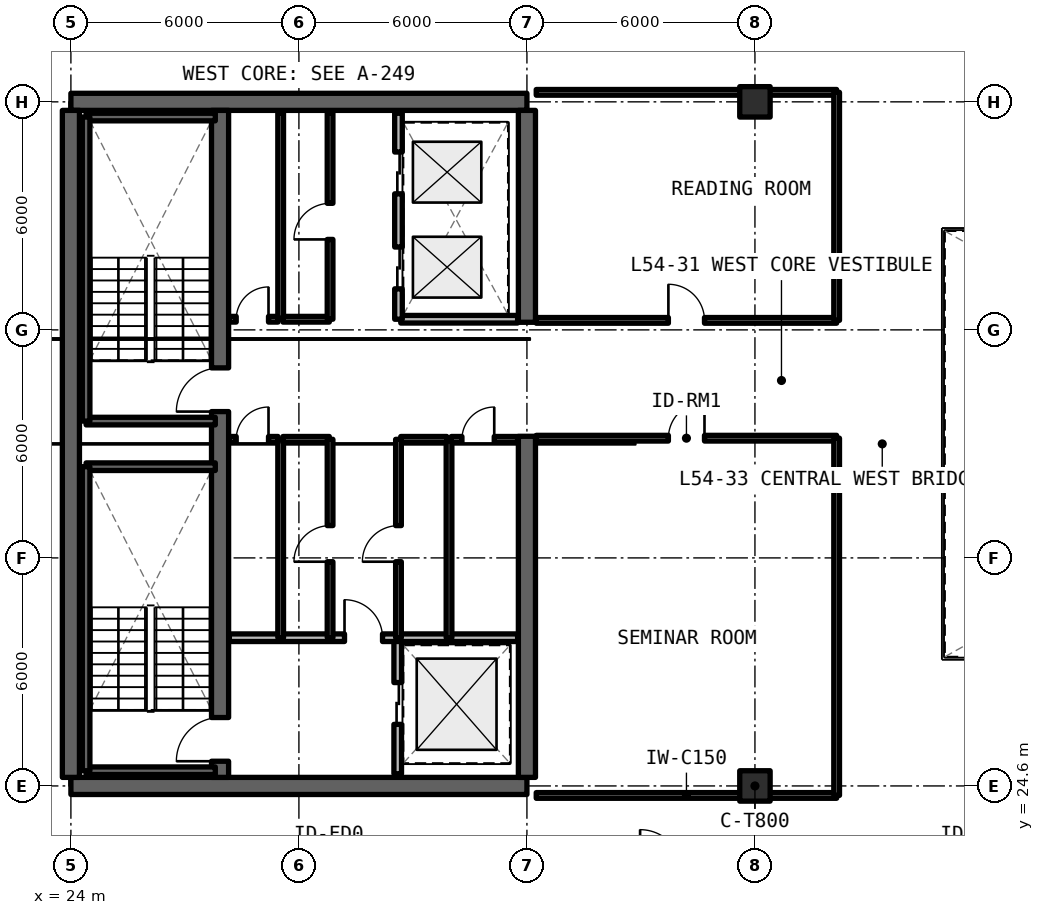
"""IFC4 building model, lengths in metres.
Left out: names, types, materials, properties, quantities, classifications, styles, units other than length and angle.
Written with IfcOpenShell. Run it as: python <this file> out.ifc"""

import sys

from ifc_helpers import new_model, si_unit, direction, frame, frame_2d, origin, origin_2d, place, context, subcontext, project, spatial, rectangle, extrude, element, fill, save


model = new_model("IFC4")
c1 = context("Model", 3, precision=1e-05, world=origin(), true_north=direction((0.0, 1.0)))
c2 = subcontext(c1, "Body", "Model", "MODEL_VIEW")
j1 = project(units=[si_unit("LENGTHUNIT", "METRE"), si_unit("PLANEANGLEUNIT", "RADIAN")], contexts=[c1])
p1 = place(None, origin())
s1 = spatial("IfcSite", under=j1, at=p1, CompositionType="ELEMENT")
p2 = place(p1, origin())
s2 = spatial("IfcBuilding", under=s1, at=p2, CompositionType="ELEMENT")
p3 = place(p2, frame((0.0, 0.0, 195.03)))
s3 = spatial("IfcBuildingStorey", under=s2, at=p3, CompositionType="ELEMENT", Elevation=195.03)
for number, where, z_axis, x_axis in (
    (1, (24.0, 24.6, 0.0), (0.0, 0.0, 1.0), (1.0, 0.0, 0.0)),
    (2, (36.0, 42.6, 0.0), (0.0, 0.0, 1.0), (-1.0, 0.0, 0.0)),
):
    element("IfcWall", number, at=place(p3, frame(where, z_axis=z_axis, x_axis=x_axis)), inside=s3, PredefinedType="SHEAR", context=c2, shape_type="SweptSolid", body=[
        extrude(rectangle(XDim=12.0, YDim=0.45, at=frame_2d((6.0, 0.0))), origin(), (0.0, 0.0, 1.0), 3.3),
    ])
p4 = place(p3, frame((24.0, 24.825, 0.0), z_axis=(0.0, 0.0, 1.0), x_axis=(0.0, 1.0, 0.0)))
e3 = element("IfcWall", 3, at=p4, inside=s3, PredefinedType="SHEAR", context=c2, shape_type="SweptSolid", body=[
    extrude(rectangle(XDim=17.55, YDim=0.45, at=frame_2d((8.775, 0.0))), origin(), (0.0, 0.0, 1.0), 3.3),
])
p5 = place(p3, frame((36.0, 24.825, 0.0), z_axis=(0.0, 0.0, 1.0), x_axis=(0.0, 1.0, 0.0)))
e4 = element("IfcWall", 4, at=p5, inside=s3, PredefinedType="SHEAR", context=c2, shape_type="SweptSolid", body=[
    extrude(rectangle(XDim=8.975, YDim=0.45, at=frame_2d((4.488, 0.0))), origin(), (0.0, 0.0, 1.0), 3.3),
])
p6 = place(p3, frame((36.0, 36.8, 0.0), z_axis=(0.0, 0.0, 1.0), x_axis=(0.0, 1.0, 0.0)))
e5 = element("IfcWall", 5, at=p6, inside=s3, PredefinedType="SHEAR", context=c2, shape_type="SweptSolid", body=[
    extrude(rectangle(XDim=5.575, YDim=0.45, at=frame_2d((2.788, 0.0))), origin(), (0.0, 0.0, 1.0), 3.3),
])
p7 = place(p3, frame((27.925, 24.825, 0.0), z_axis=(0.0, 0.0, 1.0), x_axis=(0.0, 1.0, 0.0)))
e6 = element("IfcWall", 6, at=p7, inside=s3, PredefinedType="SHEAR", context=c2, shape_type="SweptSolid", body=[
    extrude(rectangle(XDim=17.55, YDim=0.45, at=frame_2d((8.775, 0.0))), origin(), (0.0, 0.0, 1.0), 3.3),
])
p8 = place(p7, frame((0.425, 0.0, 0.0)))
e7 = element("IfcOpeningElement", 7, at=p8, cuts=e6, PredefinedType="OPENING", context=c2, shape_type="SweptSolid", body=[
    extrude(rectangle(XDim=1.15, YDim=2.15, at=frame_2d((0.575, 1.075))), frame((0.0, 0.235, 0.0), z_axis=(0.0, -1.0, 0.0), x_axis=(1.0, 0.0, 0.0)), (0.0, 0.0, 1.0), 0.47),
])
p9 = place(p7, frame((9.625, 0.0, 0.0)))
e8 = element("IfcOpeningElement", 8, at=p9, cuts=e6, PredefinedType="OPENING", context=c2, shape_type="SweptSolid", body=[
    extrude(rectangle(XDim=1.15, YDim=2.15, at=frame_2d((0.575, 1.075))), frame((0.0, 0.235, 0.0), z_axis=(0.0, -1.0, 0.0), x_axis=(1.0, 0.0, 0.0)), (0.0, 0.0, 1.0), 0.47),
])
for number, where, z_axis, x_axis in (
    (9, (42.0, 24.6, 0.0), (0.0, 0.0, 1.0), (1.0, 0.0, 0.0)),
    (10, (42.0, 42.6, 0.0), (0.0, 0.0, 1.0), (1.0, 0.0, 0.0)),
):
    element("IfcColumn", number, at=place(p3, frame(where, z_axis=z_axis, x_axis=x_axis)), inside=s3, PredefinedType="COLUMN", context=c2, shape_type="SweptSolid", body=[
        extrude(rectangle(XDim=0.8, YDim=0.8, at=origin_2d()), origin(), (0.0, 0.0, 1.0), 3.3),
    ])
p10 = place(p3, frame((32.6, 24.92, 0.0), z_axis=(0.0, 0.0, 1.0), x_axis=(0.0, 1.0, 0.0)))
e11 = element("IfcWall", 11, at=p10, inside=s3, PredefinedType="SOLIDWALL", context=c2, shape_type="SweptSolid", body=[
    extrude(rectangle(XDim=3.58, YDim=0.2, at=frame_2d((1.79, 0.0))), origin(), (0.0, 0.0, 1.0), 2.35),
])
p11 = place(p10, frame((1.3, 0.0, 0.0)))
e12 = element("IfcOpeningElement", 12, at=p11, cuts=e11, PredefinedType="OPENING", context=c2, shape_type="SweptSolid", body=[
    extrude(rectangle(XDim=1.1, YDim=2.2, at=frame_2d((0.55, 1.1))), frame((0.0, 0.11, 0.0), z_axis=(0.0, -1.0, 0.0), x_axis=(1.0, 0.0, 0.0)), (0.0, 0.0, 1.0), 0.22),
])
p12 = place(p3, frame((28.17, 28.5, 0.0), z_axis=(0.0, 0.0, 1.0), x_axis=(1.0, 0.0, 0.0)))
e13 = element("IfcWall", 13, at=p12, inside=s3, PredefinedType="SOLIDWALL", context=c2, shape_type="SweptSolid", body=[
    extrude(rectangle(XDim=7.585, YDim=0.2, at=frame_2d((3.792, 0.0))), origin(), (0.0, 0.0, 1.0), 2.35),
])
p13 = place(p12, frame((3.03, 0.0, 0.0)))
e14 = element("IfcOpeningElement", 14, at=p13, cuts=e13, PredefinedType="OPENING", context=c2, shape_type="SweptSolid", body=[
    extrude(rectangle(XDim=1.0, YDim=2.15, at=frame_2d((0.5, 1.075))), frame((0.0, 0.11, 0.0), z_axis=(0.0, -1.0, 0.0), x_axis=(1.0, 0.0, 0.0)), (0.0, 0.0, 1.0), 0.22),
])
p14 = place(p3, frame((29.52, 28.5, 0.0), z_axis=(0.0, 0.0, 1.0), x_axis=(0.0, 1.0, 0.0)))
e15 = element("IfcWall", 15, at=p14, inside=s3, PredefinedType="SOLIDWALL", context=c2, shape_type="SweptSolid", body=[
    extrude(rectangle(XDim=5.22, YDim=0.15, at=frame_2d((2.61, 0.0))), origin(), (0.0, 0.0, 1.0), 2.35),
])
p15 = place(p3, frame((28.17, 33.72, 0.0), z_axis=(0.0, 0.0, 1.0), x_axis=(1.0, 0.0, 0.0)))
e16 = element("IfcWall", 16, at=p15, inside=s3, PredefinedType="SOLIDWALL", context=c2, shape_type="SweptSolid", body=[
    extrude(rectangle(XDim=1.28, YDim=0.15, at=frame_2d((0.64, 0.0))), origin(), (0.0, 0.0, 1.0), 2.35),
])
p16 = place(p15, frame((0.18, 0.0, 0.0)))
e17 = element("IfcOpeningElement", 17, at=p16, cuts=e16, PredefinedType="OPENING", context=c2, shape_type="SweptSolid", body=[
    extrude(rectangle(XDim=0.85, YDim=2.1, at=frame_2d((0.425, 1.05))), frame((0.0, 0.085, 0.0), z_axis=(0.0, -1.0, 0.0), x_axis=(1.0, 0.0, 0.0)), (0.0, 0.0, 1.0), 0.17),
])
p17 = place(p3, frame((29.58, 33.72, 0.0), z_axis=(0.0, 0.0, 1.0), x_axis=(1.0, 0.0, 0.0)))
e18 = element("IfcWall", 18, at=p17, inside=s3, PredefinedType="SOLIDWALL", context=c2, shape_type="SweptSolid", body=[
    extrude(rectangle(XDim=1.22, YDim=0.15, at=frame_2d((0.61, 0.0))), origin(), (0.0, 0.0, 1.0), 2.35),
])
p18 = place(p3, frame((30.82, 28.5, 0.0), z_axis=(0.0, 0.0, 1.0), x_axis=(0.0, 1.0, 0.0)))
e19 = element("IfcWall", 19, at=p18, inside=s3, PredefinedType="SOLIDWALL", context=c2, shape_type="SweptSolid", body=[
    extrude(rectangle(XDim=5.22, YDim=0.15, at=frame_2d((2.61, 0.0))), origin(), (0.0, 0.0, 1.0), 2.35),
])
p19 = place(p18, frame((2.0, 0.0, 0.0)))
e20 = element("IfcOpeningElement", 20, at=p19, cuts=e19, PredefinedType="OPENING", context=c2, shape_type="SweptSolid", body=[
    extrude(rectangle(XDim=0.95, YDim=2.15, at=frame_2d((0.475, 1.075))), frame((0.0, 0.085, 0.0), z_axis=(0.0, -1.0, 0.0), x_axis=(1.0, 0.0, 0.0)), (0.0, 0.0, 1.0), 0.17),
])
p20 = place(p3, frame((33.95, 28.5, 0.0), z_axis=(0.0, 0.0, 1.0), x_axis=(0.0, 1.0, 0.0)))
e21 = element("IfcWall", 21, at=p20, inside=s3, PredefinedType="SOLIDWALL", context=c2, shape_type="SweptSolid", body=[
    extrude(rectangle(XDim=5.22, YDim=0.15, at=frame_2d((2.61, 0.0))), origin(), (0.0, 0.0, 1.0), 2.35),
])
p21 = place(p3, frame((32.68, 33.72, 0.0), z_axis=(0.0, 0.0, 1.0), x_axis=(1.0, 0.0, 0.0)))
e22 = element("IfcWall", 22, at=p21, inside=s3, PredefinedType="SOLIDWALL", context=c2, shape_type="SweptSolid", body=[
    extrude(rectangle(XDim=1.21, YDim=0.15, at=frame_2d((0.605, 0.0))), origin(), (0.0, 0.0, 1.0), 2.35),
])
p22 = place(p3, frame((34.01, 33.72, 0.0), z_axis=(0.0, 0.0, 1.0), x_axis=(1.0, 0.0, 0.0)))
e23 = element("IfcWall", 23, at=p22, inside=s3, PredefinedType="SOLIDWALL", context=c2, shape_type="SweptSolid", body=[
    extrude(rectangle(XDim=1.745, YDim=0.15, at=frame_2d((0.873, 0.0))), origin(), (0.0, 0.0, 1.0), 2.35),
])
p23 = place(p22, frame((0.28, 0.0, 0.0)))
e24 = element("IfcOpeningElement", 24, at=p23, cuts=e23, PredefinedType="OPENING", context=c2, shape_type="SweptSolid", body=[
    extrude(rectangle(XDim=0.85, YDim=2.1, at=frame_2d((0.425, 1.05))), frame((0.0, 0.085, 0.0), z_axis=(0.0, -1.0, 0.0), x_axis=(1.0, 0.0, 0.0)), (0.0, 0.0, 1.0), 0.17),
])
p24 = place(p3, frame((32.62, 28.5, 0.0), z_axis=(0.0, 0.0, 1.0), x_axis=(0.0, 1.0, 0.0)))
e25 = element("IfcWall", 25, at=p24, inside=s3, PredefinedType="SOLIDWALL", context=c2, shape_type="SweptSolid", body=[
    extrude(rectangle(XDim=5.22, YDim=0.15, at=frame_2d((2.61, 0.0))), origin(), (0.0, 0.0, 1.0), 2.35),
])
p25 = place(p24, frame((2.0, 0.0, 0.0)))
e26 = element("IfcOpeningElement", 26, at=p25, cuts=e25, PredefinedType="OPENING", context=c2, shape_type="SweptSolid", body=[
    extrude(rectangle(XDim=0.95, YDim=2.15, at=frame_2d((0.475, 1.075))), frame((0.0, 0.085, 0.0), z_axis=(0.0, -1.0, 0.0), x_axis=(1.0, 0.0, 0.0)), (0.0, 0.0, 1.0), 0.17),
])
p26 = place(p3, frame((29.52, 36.88, 0.0), z_axis=(0.0, 0.0, 1.0), x_axis=(0.0, 1.0, 0.0)))
e27 = element("IfcWall", 27, at=p26, inside=s3, PredefinedType="SOLIDWALL", context=c2, shape_type="SweptSolid", body=[
    extrude(rectangle(XDim=5.42, YDim=0.15, at=frame_2d((2.71, 0.0))), origin(), (0.0, 0.0, 1.0), 2.35),
])
p27 = place(p3, frame((28.17, 36.88, 0.0), z_axis=(0.0, 0.0, 1.0), x_axis=(1.0, 0.0, 0.0)))
e28 = element("IfcWall", 28, at=p27, inside=s3, PredefinedType="SOLIDWALL", context=c2, shape_type="SweptSolid", body=[
    extrude(rectangle(XDim=1.28, YDim=0.15, at=frame_2d((0.64, 0.0))), origin(), (0.0, 0.0, 1.0), 2.35),
])
p28 = place(p27, frame((0.18, 0.0, 0.0)))
e29 = element("IfcOpeningElement", 29, at=p28, cuts=e28, PredefinedType="OPENING", context=c2, shape_type="SweptSolid", body=[
    extrude(rectangle(XDim=0.85, YDim=2.1, at=frame_2d((0.425, 1.05))), frame((0.0, 0.085, 0.0), z_axis=(0.0, -1.0, 0.0), x_axis=(1.0, 0.0, 0.0)), (0.0, 0.0, 1.0), 0.17),
])
p29 = place(p3, frame((29.58, 36.88, 0.0), z_axis=(0.0, 0.0, 1.0), x_axis=(1.0, 0.0, 0.0)))
e30 = element("IfcWall", 30, at=p29, inside=s3, PredefinedType="SOLIDWALL", context=c2, shape_type="SweptSolid", body=[
    extrude(rectangle(XDim=1.22, YDim=0.15, at=frame_2d((0.61, 0.0))), origin(), (0.0, 0.0, 1.0), 2.35),
])
p30 = place(p3, frame((30.82, 36.88, 0.0), z_axis=(0.0, 0.0, 1.0), x_axis=(0.0, 1.0, 0.0)))
e31 = element("IfcWall", 31, at=p30, inside=s3, PredefinedType="SOLIDWALL", context=c2, shape_type="SweptSolid", body=[
    extrude(rectangle(XDim=5.42, YDim=0.15, at=frame_2d((2.71, 0.0))), origin(), (0.0, 0.0, 1.0), 2.35),
])
p31 = place(p30, frame((2.1, 0.0, 0.0)))
e32 = element("IfcOpeningElement", 32, at=p31, cuts=e31, PredefinedType="OPENING", context=c2, shape_type="SweptSolid", body=[
    extrude(rectangle(XDim=0.95, YDim=2.15, at=frame_2d((0.475, 1.075))), frame((0.0, 0.085, 0.0), z_axis=(0.0, -1.0, 0.0), x_axis=(1.0, 0.0, 0.0)), (0.0, 0.0, 1.0), 0.17),
])
p32 = place(p3, frame((32.68, 36.88, 0.0), z_axis=(0.0, 0.0, 1.0), x_axis=(1.0, 0.0, 0.0)))
e33 = element("IfcWall", 33, at=p32, inside=s3, PredefinedType="SOLIDWALL", context=c2, shape_type="SweptSolid", body=[
    extrude(rectangle(XDim=3.075, YDim=0.2, at=frame_2d((1.538, 0.0))), origin(), (0.0, 0.0, 1.0), 2.35),
])
p33 = place(p3, frame((32.62, 36.88, 0.0), z_axis=(0.0, 0.0, 1.0), x_axis=(0.0, 1.0, 0.0)))
e34 = element("IfcWall", 34, at=p33, inside=s3, PredefinedType="SOLIDWALL", context=c2, shape_type="SweptSolid", body=[
    extrude(rectangle(XDim=5.42, YDim=0.2, at=frame_2d((2.71, 0.0))), origin(), (0.0, 0.0, 1.0), 2.35),
])
p34 = place(p33, frame((0.8, 0.0, 0.0)))
e35 = element("IfcOpeningElement", 35, at=p34, cuts=e34, PredefinedType="OPENING", context=c2, shape_type="SweptSolid", body=[
    extrude(rectangle(XDim=1.1, YDim=2.2, at=frame_2d((0.55, 1.1))), frame((0.0, 0.11, 0.0), z_axis=(0.0, -1.0, 0.0), x_axis=(1.0, 0.0, 0.0)), (0.0, 0.0, 1.0), 0.22),
])
p35 = place(p33, frame((3.3, 0.0, 0.0)))
e36 = element("IfcOpeningElement", 36, at=p35, cuts=e34, PredefinedType="OPENING", context=c2, shape_type="SweptSolid", body=[
    extrude(rectangle(XDim=1.1, YDim=2.2, at=frame_2d((0.55, 1.1))), frame((0.0, 0.11, 0.0), z_axis=(0.0, -1.0, 0.0), x_axis=(1.0, 0.0, 0.0)), (0.0, 0.0, 1.0), 0.22),
])
p36 = place(p3, frame((36.245, 24.35, 0.0), z_axis=(0.0, 0.0, 1.0), x_axis=(1.0, 0.0, 0.0)))
e37 = element("IfcWall", 37, at=p36, inside=s3, PredefinedType="SOLIDWALL", context=c2, shape_type="SweptSolid", body=[
    extrude(rectangle(XDim=7.905, YDim=0.15, at=frame_2d((3.952, 0.0))), origin(), (0.0, 0.0, 1.0), 2.35),
])
p37 = place(p3, frame((36.245, 33.75, 0.0), z_axis=(0.0, 0.0, 1.0), x_axis=(1.0, 0.0, 0.0)))
e38 = element("IfcWall", 38, at=p37, inside=s3, PredefinedType="SOLIDWALL", context=c2, shape_type="SweptSolid", body=[
    extrude(rectangle(XDim=7.905, YDim=0.15, at=frame_2d((3.952, 0.0))), origin(), (0.0, 0.0, 1.0), 2.35),
])
p38 = place(p37, frame((3.478, 0.0, 0.0)))
e39 = element("IfcOpeningElement", 39, at=p38, cuts=e38, PredefinedType="OPENING", context=c2, shape_type="SweptSolid", body=[
    extrude(rectangle(XDim=0.95, YDim=2.15, at=frame_2d((0.475, 1.075))), frame((0.0, 0.085, 0.0), z_axis=(0.0, -1.0, 0.0), x_axis=(1.0, 0.0, 0.0)), (0.0, 0.0, 1.0), 0.17),
])
p39 = place(p3, frame((44.15, 24.35, 0.0), z_axis=(0.0, 0.0, 1.0), x_axis=(0.0, 1.0, 0.0)))
e40 = element("IfcWall", 40, at=p39, inside=s3, PredefinedType="SOLIDWALL", context=c2, shape_type="SweptSolid", body=[
    extrude(rectangle(XDim=9.4, YDim=0.15, at=frame_2d((4.7, 0.0))), origin(), (0.0, 0.0, 1.0), 2.35),
])
p40 = place(p3, frame((36.245, 36.85, 0.0), z_axis=(0.0, 0.0, 1.0), x_axis=(1.0, 0.0, 0.0)))
e41 = element("IfcWall", 41, at=p40, inside=s3, PredefinedType="SOLIDWALL", context=c2, shape_type="SweptSolid", body=[
    extrude(rectangle(XDim=7.905, YDim=0.15, at=frame_2d((3.952, 0.0))), origin(), (0.0, 0.0, 1.0), 2.35),
])
p41 = place(p40, frame((3.478, 0.0, 0.0)))
e42 = element("IfcOpeningElement", 42, at=p41, cuts=e41, PredefinedType="OPENING", context=c2, shape_type="SweptSolid", body=[
    extrude(rectangle(XDim=0.95, YDim=2.15, at=frame_2d((0.475, 1.075))), frame((0.0, 0.085, 0.0), z_axis=(0.0, -1.0, 0.0), x_axis=(1.0, 0.0, 0.0)), (0.0, 0.0, 1.0), 0.17),
])
p42 = place(p3, frame((36.245, 42.85, 0.0), z_axis=(0.0, 0.0, 1.0), x_axis=(1.0, 0.0, 0.0)))
e43 = element("IfcWall", 43, at=p42, inside=s3, PredefinedType="SOLIDWALL", context=c2, shape_type="SweptSolid", body=[
    extrude(rectangle(XDim=7.905, YDim=0.15, at=frame_2d((3.952, 0.0))), origin(), (0.0, 0.0, 1.0), 2.35),
])
p43 = place(p3, frame((44.15, 36.85, 0.0), z_axis=(0.0, 0.0, 1.0), x_axis=(0.0, 1.0, 0.0)))
e44 = element("IfcWall", 44, at=p43, inside=s3, PredefinedType="SOLIDWALL", context=c2, shape_type="SweptSolid", body=[
    extrude(rectangle(XDim=6.0, YDim=0.15, at=frame_2d((3.0, 0.0))), origin(), (0.0, 0.0, 1.0), 2.35),
])
for number, where, z_axis, x_axis in (
    (45, (24.4, 25.0, 0.0), (0.0, 0.0, 1.0), (1.0, 0.0, 0.0)),
    (46, (27.8, 33.0, 0.0), (0.0, 0.0, 1.0), (-1.0, 0.0, 0.0)),
):
    element("IfcWall", number, at=place(p3, frame(where, z_axis=z_axis, x_axis=x_axis)), inside=s3, PredefinedType="SOLIDWALL", context=c2, shape_type="SweptSolid", body=[
        extrude(rectangle(XDim=3.4, YDim=0.2, at=frame_2d((1.7, 0.0))), origin(), (0.0, 0.0, 1.0), 3.3),
    ])
p44 = place(p3, frame((24.4, 33.0, 0.0), z_axis=(0.0, 0.0, 1.0), x_axis=(0.0, -1.0, 0.0)))
e47 = element("IfcWall", 47, at=p44, inside=s3, PredefinedType="SOLIDWALL", context=c2, shape_type="SweptSolid", body=[
    extrude(rectangle(XDim=8.0, YDim=0.2, at=frame_2d((4.0, 0.0))), origin(), (0.0, 0.0, 1.0), 3.3),
])
for number, where, z_axis, x_axis in (
    (48, (24.4, 34.2, 0.0), (0.0, 0.0, 1.0), (1.0, 0.0, 0.0)),
    (49, (27.8, 42.2, 0.0), (0.0, 0.0, 1.0), (-1.0, 0.0, 0.0)),
):
    element("IfcWall", number, at=place(p3, frame(where, z_axis=z_axis, x_axis=x_axis)), inside=s3, PredefinedType="SOLIDWALL", context=c2, shape_type="SweptSolid", body=[
        extrude(rectangle(XDim=3.4, YDim=0.2, at=frame_2d((1.7, 0.0))), origin(), (0.0, 0.0, 1.0), 3.3),
    ])
p45 = place(p3, frame((24.4, 42.2, 0.0), z_axis=(0.0, 0.0, 1.0), x_axis=(0.0, -1.0, 0.0)))
e50 = element("IfcWall", 50, at=p45, inside=s3, PredefinedType="SOLIDWALL", context=c2, shape_type="SweptSolid", body=[
    extrude(rectangle(XDim=8.0, YDim=0.2, at=frame_2d((4.0, 0.0))), origin(), (0.0, 0.0, 1.0), 3.3),
])
p46 = place(p11, origin())
e51 = element("IfcDoor", 51, at=p46, inside=s3, OperationType="SLIDING_TO_LEFT", PredefinedType="DOOR", context=c2, shape_type="SweptSolid", body=[
    extrude(rectangle(XDim=1.1, YDim=2.2, at=frame_2d((0.55, 1.1))), frame((0.0, 0.025, 0.0), z_axis=(0.0, -1.0, 0.0), x_axis=(1.0, 0.0, 0.0)), (0.0, 0.0, 1.0), 0.05),
])
fill(e12, e51)
p47 = place(p13, origin())
e52 = element("IfcDoor", 52, at=p47, inside=s3, OperationType="SINGLE_SWING_LEFT", PredefinedType="DOOR", context=c2, shape_type="SweptSolid", body=[
    extrude(rectangle(XDim=1.0, YDim=2.15, at=frame_2d((0.5, 1.075))), frame((0.0, 0.025, 0.0), z_axis=(0.0, -1.0, 0.0), x_axis=(1.0, 0.0, 0.0)), (0.0, 0.0, 1.0), 0.05),
])
fill(e14, e52)
p48 = place(p16, origin())
e53 = element("IfcDoor", 53, at=p48, inside=s3, OperationType="SINGLE_SWING_RIGHT", PredefinedType="DOOR", context=c2, shape_type="SweptSolid", body=[
    extrude(rectangle(XDim=0.85, YDim=2.1, at=frame_2d((0.425, 1.05))), frame((0.0, 0.025, 0.0), z_axis=(0.0, -1.0, 0.0), x_axis=(1.0, 0.0, 0.0)), (0.0, 0.0, 1.0), 0.05),
])
fill(e17, e53)
p49 = place(p19, origin())
e54 = element("IfcDoor", 54, at=p49, inside=s3, OperationType="SINGLE_SWING_LEFT", PredefinedType="DOOR", context=c2, shape_type="SweptSolid", body=[
    extrude(rectangle(XDim=0.95, YDim=2.15, at=frame_2d((0.475, 1.075))), frame((0.0, 0.025, 0.0), z_axis=(0.0, -1.0, 0.0), x_axis=(1.0, 0.0, 0.0)), (0.0, 0.0, 1.0), 0.05),
])
fill(e20, e54)
p50 = place(p23, origin())
e55 = element("IfcDoor", 55, at=p50, inside=s3, OperationType="SINGLE_SWING_RIGHT", PredefinedType="DOOR", context=c2, shape_type="SweptSolid", body=[
    extrude(rectangle(XDim=0.85, YDim=2.1, at=frame_2d((0.425, 1.05))), frame((0.0, 0.025, 0.0), z_axis=(0.0, -1.0, 0.0), x_axis=(1.0, 0.0, 0.0)), (0.0, 0.0, 1.0), 0.05),
])
fill(e24, e55)
p51 = place(p25, origin())
e56 = element("IfcDoor", 56, at=p51, inside=s3, OperationType="SINGLE_SWING_LEFT", PredefinedType="DOOR", context=c2, shape_type="SweptSolid", body=[
    extrude(rectangle(XDim=0.95, YDim=2.15, at=frame_2d((0.475, 1.075))), frame((0.0, 0.025, 0.0), z_axis=(0.0, -1.0, 0.0), x_axis=(1.0, 0.0, 0.0)), (0.0, 0.0, 1.0), 0.05),
])
fill(e26, e56)
p52 = place(p28, origin())
e57 = element("IfcDoor", 57, at=p52, inside=s3, OperationType="SINGLE_SWING_RIGHT", PredefinedType="DOOR", context=c2, shape_type="SweptSolid", body=[
    extrude(rectangle(XDim=0.85, YDim=2.1, at=frame_2d((0.425, 1.05))), frame((0.0, 0.025, 0.0), z_axis=(0.0, -1.0, 0.0), x_axis=(1.0, 0.0, 0.0)), (0.0, 0.0, 1.0), 0.05),
])
fill(e29, e57)
p53 = place(p31, origin())
e58 = element("IfcDoor", 58, at=p53, inside=s3, OperationType="SINGLE_SWING_LEFT", PredefinedType="DOOR", context=c2, shape_type="SweptSolid", body=[
    extrude(rectangle(XDim=0.95, YDim=2.15, at=frame_2d((0.475, 1.075))), frame((0.0, 0.025, 0.0), z_axis=(0.0, -1.0, 0.0), x_axis=(1.0, 0.0, 0.0)), (0.0, 0.0, 1.0), 0.05),
])
fill(e32, e58)
p54 = place(p34, origin())
e59 = element("IfcDoor", 59, at=p54, inside=s3, OperationType="SLIDING_TO_LEFT", PredefinedType="DOOR", context=c2, shape_type="SweptSolid", body=[
    extrude(rectangle(XDim=1.1, YDim=2.2, at=frame_2d((0.55, 1.1))), frame((0.0, 0.025, 0.0), z_axis=(0.0, -1.0, 0.0), x_axis=(1.0, 0.0, 0.0)), (0.0, 0.0, 1.0), 0.05),
])
fill(e35, e59)
p55 = place(p35, origin())
e60 = element("IfcDoor", 60, at=p55, inside=s3, OperationType="SLIDING_TO_RIGHT", PredefinedType="DOOR", context=c2, shape_type="SweptSolid", body=[
    extrude(rectangle(XDim=1.1, YDim=2.2, at=frame_2d((0.55, 1.1))), frame((0.0, 0.025, 0.0), z_axis=(0.0, -1.0, 0.0), x_axis=(1.0, 0.0, 0.0)), (0.0, 0.0, 1.0), 0.05),
])
fill(e36, e60)
p56 = place(p38, origin())
e61 = element("IfcDoor", 61, at=p56, inside=s3, OperationType="SINGLE_SWING_RIGHT", PredefinedType="DOOR", context=c2, shape_type="SweptSolid", body=[
    extrude(rectangle(XDim=0.95, YDim=2.15, at=frame_2d((0.475, 1.075))), frame((0.0, 0.025, 0.0), z_axis=(0.0, -1.0, 0.0), x_axis=(1.0, 0.0, 0.0)), (0.0, 0.0, 1.0), 0.05),
])
fill(e39, e61)
p57 = place(p41, origin())
e62 = element("IfcDoor", 62, at=p57, inside=s3, OperationType="SINGLE_SWING_LEFT", PredefinedType="DOOR", context=c2, shape_type="SweptSolid", body=[
    extrude(rectangle(XDim=0.95, YDim=2.15, at=frame_2d((0.475, 1.075))), frame((0.0, 0.025, 0.0), z_axis=(0.0, -1.0, 0.0), x_axis=(1.0, 0.0, 0.0)), (0.0, 0.0, 1.0), 0.05),
])
fill(e42, e62)
p58 = place(p8, origin())
e63 = element("IfcDoor", 63, at=p58, inside=s3, OperationType="SINGLE_SWING_RIGHT", PredefinedType="DOOR", context=c2, shape_type="SweptSolid", body=[
    extrude(rectangle(XDim=1.15, YDim=2.15, at=frame_2d((0.575, 1.075))), frame((0.0, 0.025, 0.0), z_axis=(0.0, -1.0, 0.0), x_axis=(1.0, 0.0, 0.0)), (0.0, 0.0, 1.0), 0.05),
])
fill(e7, e63)
p59 = place(p9, origin())
e64 = element("IfcDoor", 64, at=p59, inside=s3, OperationType="SINGLE_SWING_LEFT", PredefinedType="DOOR", context=c2, shape_type="SweptSolid", body=[
    extrude(rectangle(XDim=1.15, YDim=2.15, at=frame_2d((0.575, 1.075))), frame((0.0, 0.025, 0.0), z_axis=(0.0, -1.0, 0.0), x_axis=(1.0, 0.0, 0.0)), (0.0, 0.0, 1.0), 0.05),
])
fill(e8, e64)
save(model, sys.argv[1])
